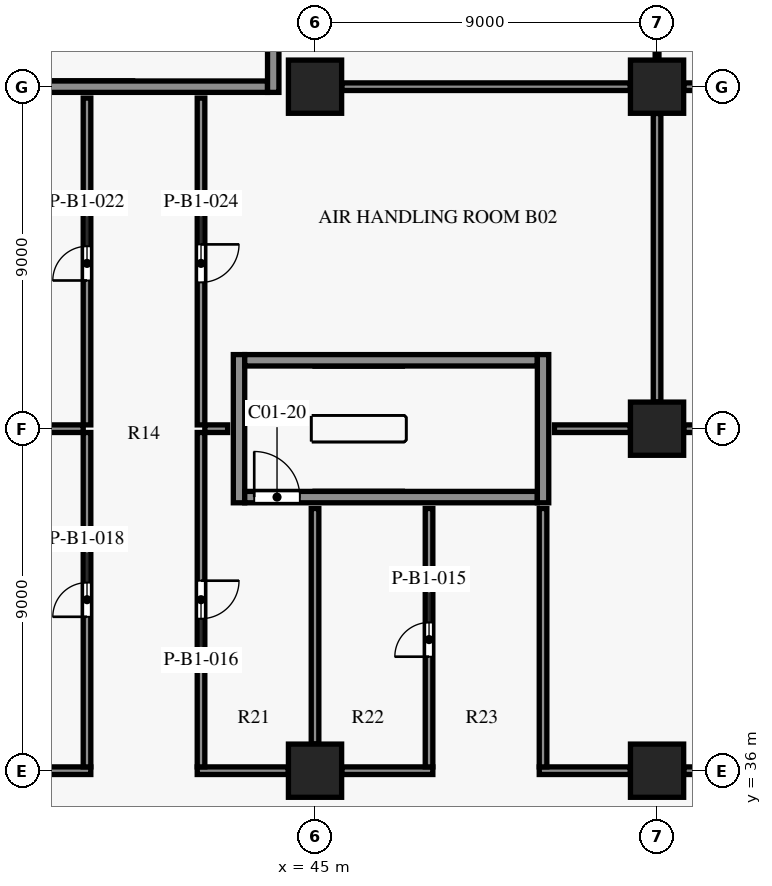
"""IFC4 building model, lengths in metres.
Left out: names, types, materials, properties, quantities, classifications, styles, units other than length and angle.
Written with IfcOpenShell. Run it as: python <this file> out.ifc"""

import sys

from ifc_helpers import new_model, si_unit, direction, frame, frame_2d, origin, origin_2d, place, context, subcontext, project, spatial, rectangle, extrude, element, fill, save


model = new_model("IFC4")
c1 = context("Model", 3, precision=1e-05, world=origin(), true_north=direction((0.0, 1.0)))
c2 = subcontext(c1, "Body", "Model", "MODEL_VIEW")
j1 = project(units=[si_unit("LENGTHUNIT", "METRE"), si_unit("PLANEANGLEUNIT", "RADIAN")], contexts=[c1])
p1 = place(None, origin())
s1 = spatial("IfcSite", under=j1, at=p1, CompositionType="ELEMENT")
p2 = place(p1, origin())
s2 = spatial("IfcBuilding", under=s1, at=p2, CompositionType="ELEMENT")
p3 = place(p2, frame((0.0, 0.0, -6.0)))
s3 = spatial("IfcBuildingStorey", under=s2, at=p3, CompositionType="ELEMENT", Elevation=-6.0)
for number, where, z_axis, x_axis in (
    (1, (45.0, 36.0, 0.0), (0.0, 0.0, 1.0), (1.0, 0.0, 0.0)),
    (2, (54.0, 36.0, 0.0), (0.0, 0.0, 1.0), (1.0, 0.0, 0.0)),
    (3, (45.0, 54.0, 0.0), (0.0, 0.0, 1.0), (1.0, 0.0, 0.0)),
    (4, (54.0, 45.0, 0.0), (0.0, 0.0, 1.0), (1.0, 0.0, 0.0)),
    (5, (54.0, 54.0, 0.0), (0.0, 0.0, 1.0), (1.0, 0.0, 0.0)),
):
    element("IfcColumn", number, at=place(p3, frame(where, z_axis=z_axis, x_axis=x_axis)), inside=s3, PredefinedType="COLUMN", context=c2, shape_type="SweptSolid", body=[
        extrude(rectangle(XDim=1.4, YDim=1.4, at=origin_2d()), origin(), (0.0, 0.0, 1.0), 6.0),
    ])
p4 = place(p3, frame((43.15, 43.2, 0.0), z_axis=(0.0, 0.0, 1.0), x_axis=(1.0, 0.0, 0.0)))
e6 = element("IfcWall", 6, at=p4, inside=s3, PredefinedType="SHEAR", context=c2, shape_type="SweptSolid", body=[
    extrude(rectangle(XDim=7.7, YDim=0.3, at=frame_2d((3.85, 0.0))), origin(), (0.0, 0.0, 1.0), 5.6),
])
p5 = place(p4, frame((0.25, 0.0, 0.0)))
e7 = element("IfcOpeningElement", 7, at=p5, cuts=e6, PredefinedType="OPENING", context=c2, shape_type="SweptSolid", body=[
    extrude(rectangle(XDim=1.2, YDim=2.2, at=frame_2d((0.6, 1.1))), frame((0.0, 0.16, 0.0), z_axis=(0.0, -1.0, 0.0), x_axis=(1.0, 0.0, 0.0)), (0.0, 0.0, 1.0), 0.32),
])
p6 = place(p3, frame((43.15, 46.8, 0.0), z_axis=(0.0, 0.0, 1.0), x_axis=(1.0, 0.0, 0.0)))
e8 = element("IfcWall", 8, at=p6, inside=s3, PredefinedType="SHEAR", context=c2, shape_type="SweptSolid", body=[
    extrude(rectangle(XDim=7.7, YDim=0.3, at=frame_2d((3.85, 0.0))), origin(), (0.0, 0.0, 1.0), 5.6),
])
p7 = place(p3, frame((36.05, 54.0, 0.0), z_axis=(0.0, 0.0, 1.0), x_axis=(1.0, 0.0, 0.0)))
e9 = element("IfcWall", 9, at=p7, inside=s3, PredefinedType="SHEAR", context=c2, shape_type="SweptSolid", body=[
    extrude(rectangle(XDim=7.7, YDim=0.3, at=frame_2d((3.85, 0.0))), origin(), (0.0, 0.0, 1.0), 5.6),
])
p8 = place(p7, frame((0.35, 0.0, 0.0)))
e10 = element("IfcOpeningElement", 10, at=p8, cuts=e9, PredefinedType="OPENING", context=c2, shape_type="SweptSolid", body=[
    extrude(rectangle(XDim=1.2, YDim=2.2, at=frame_2d((0.6, 1.1))), frame((0.0, 0.16, 0.0), z_axis=(0.0, -1.0, 0.0), x_axis=(1.0, 0.0, 0.0)), (0.0, 0.0, 1.0), 0.32),
])
for number, where, z_axis, x_axis in (
    (11, (43.0, 43.05, 0.0), (0.0, 0.0, 1.0), (0.0, 1.0, 0.0)),
    (12, (43.9, 53.85, 0.0), (0.0, 0.0, 1.0), (0.0, 1.0, 0.0)),
    (13, (51.0, 43.05, 0.0), (0.0, 0.0, 1.0), (0.0, 1.0, 0.0)),
):
    element("IfcWall", number, at=place(p3, frame(where, z_axis=z_axis, x_axis=x_axis)), inside=s3, PredefinedType="SHEAR", context=c2, shape_type="SweptSolid", body=[
        extrude(rectangle(XDim=3.9, YDim=0.3, at=frame_2d((1.95, 0.0))), origin(), (0.0, 0.0, 1.0), 5.6),
    ])
for number, where, z_axis, x_axis in (
    (14, (36.705, 36.0, 0.0), (0.0, 0.0, 1.0), (1.0, 0.0, 0.0)),
    (15, (41.9, 36.0, 0.0), (0.0, 0.0, 1.0), (1.0, 0.0, 0.0)),
    (16, (45.705, 36.0, 0.0), (0.0, 0.0, 1.0), (1.0, 0.0, 0.0)),
    (17, (50.9, 36.0, 0.0), (0.0, 0.0, 1.0), (1.0, 0.0, 0.0)),
):
    element("IfcWall", number, at=place(p3, frame(where, z_axis=z_axis, x_axis=x_axis)), inside=s3, PredefinedType="PARTITIONING", context=c2, shape_type="SweptSolid", body=[
        extrude(rectangle(XDim=2.395, YDim=0.2, at=frame_2d((1.198, 0.0))), origin(), (0.0, 0.0, 1.0), 5.58),
    ])
p9 = place(p3, frame((54.705, 36.0, 0.0), z_axis=(0.0, 0.0, 1.0), x_axis=(1.0, 0.0, 0.0)))
e18 = element("IfcWall", 18, at=p9, inside=s3, PredefinedType="PARTITIONING", context=c2, shape_type="SweptSolid", body=[
    extrude(rectangle(XDim=7.59, YDim=0.2, at=frame_2d((3.795, 0.0))), origin(), (0.0, 0.0, 1.0), 5.58),
])
p10 = place(p9, frame((3.295, 0.0, 0.0)))
e19 = element("IfcOpeningElement", 19, at=p10, cuts=e18, PredefinedType="OPENING", context=c2, shape_type="SweptSolid", body=[
    extrude(rectangle(XDim=1.0, YDim=2.1, at=frame_2d((0.5, 1.05))), frame((0.0, 0.11, 0.0), z_axis=(0.0, -1.0, 0.0), x_axis=(1.0, 0.0, 0.0)), (0.0, 0.0, 1.0), 0.22),
])
p11 = place(p3, frame((39.0, 36.1, 0.0), z_axis=(0.0, 0.0, 1.0), x_axis=(0.0, 1.0, 0.0)))
e20 = element("IfcWall", 20, at=p11, inside=s3, PredefinedType="PARTITIONING", context=c2, shape_type="SweptSolid", body=[
    extrude(rectangle(XDim=8.8, YDim=0.2, at=frame_2d((4.4, 0.0))), origin(), (0.0, 0.0, 1.0), 5.58),
])
p12 = place(p11, frame((3.95, 0.0, 0.0)))
e21 = element("IfcOpeningElement", 21, at=p12, cuts=e20, PredefinedType="OPENING", context=c2, shape_type="SweptSolid", body=[
    extrude(rectangle(XDim=0.9, YDim=2.1, at=frame_2d((0.45, 1.05))), frame((0.0, 0.11, 0.0), z_axis=(0.0, -1.0, 0.0), x_axis=(1.0, 0.0, 0.0)), (0.0, 0.0, 1.0), 0.22),
])
p13 = place(p3, frame((48.0, 36.1, 0.0), z_axis=(0.0, 0.0, 1.0), x_axis=(0.0, 1.0, 0.0)))
e22 = element("IfcWall", 22, at=p13, inside=s3, PredefinedType="PARTITIONING", context=c2, shape_type="SweptSolid", body=[
    extrude(rectangle(XDim=6.8, YDim=0.2, at=frame_2d((3.4, 0.0))), origin(), (0.0, 0.0, 1.0), 5.58),
])
p14 = place(p13, frame((2.9, 0.0, 0.0)))
e23 = element("IfcOpeningElement", 23, at=p14, cuts=e22, PredefinedType="OPENING", context=c2, shape_type="SweptSolid", body=[
    extrude(rectangle(XDim=0.9, YDim=2.1, at=frame_2d((0.45, 1.05))), frame((0.0, 0.11, 0.0), z_axis=(0.0, -1.0, 0.0), x_axis=(1.0, 0.0, 0.0)), (0.0, 0.0, 1.0), 0.22),
])
p15 = place(p3, frame((45.0, 36.705, 0.0), z_axis=(0.0, 0.0, 1.0), x_axis=(0.0, 1.0, 0.0)))
e24 = element("IfcWall", 24, at=p15, inside=s3, PredefinedType="PARTITIONING", context=c2, shape_type="SweptSolid", body=[
    extrude(rectangle(XDim=6.195, YDim=0.2, at=frame_2d((3.097, 0.0))), origin(), (0.0, 0.0, 1.0), 5.58),
])
p16 = place(p3, frame((51.0, 42.9, 0.0), z_axis=(0.0, 0.0, 1.0), x_axis=(0.0, -1.0, 0.0)))
e25 = element("IfcWall", 25, at=p16, inside=s3, PredefinedType="PARTITIONING", context=c2, shape_type="SweptSolid", body=[
    extrude(rectangle(XDim=6.8, YDim=0.2, at=frame_2d((3.4, 0.0))), origin(), (0.0, 0.0, 1.0), 5.58),
])
p17 = place(p3, frame((42.0, 44.9, 0.0), z_axis=(0.0, 0.0, 1.0), x_axis=(0.0, -1.0, 0.0)))
e26 = element("IfcWall", 26, at=p17, inside=s3, PredefinedType="PARTITIONING", context=c2, shape_type="SweptSolid", body=[
    extrude(rectangle(XDim=8.8, YDim=0.2, at=frame_2d((4.4, 0.0))), origin(), (0.0, 0.0, 1.0), 5.58),
])
p18 = place(p17, frame((3.9, 0.0, 0.0)))
e27 = element("IfcOpeningElement", 27, at=p18, cuts=e26, PredefinedType="OPENING", context=c2, shape_type="SweptSolid", body=[
    extrude(rectangle(XDim=1.0, YDim=2.1, at=frame_2d((0.5, 1.05))), frame((0.0, 0.11, 0.0), z_axis=(0.0, -1.0, 0.0), x_axis=(1.0, 0.0, 0.0)), (0.0, 0.0, 1.0), 0.22),
])
p19 = place(p3, frame((36.705, 45.0, 0.0), z_axis=(0.0, 0.0, 1.0), x_axis=(1.0, 0.0, 0.0)))
e28 = element("IfcWall", 28, at=p19, inside=s3, PredefinedType="PARTITIONING", context=c2, shape_type="SweptSolid", body=[
    extrude(rectangle(XDim=2.195, YDim=0.2, at=frame_2d((1.097, 0.0))), origin(), (0.0, 0.0, 1.0), 5.58),
])
p20 = place(p3, frame((42.1, 45.0, 0.0), z_axis=(0.0, 0.0, 1.0), x_axis=(1.0, 0.0, 0.0)))
e29 = element("IfcWall", 29, at=p20, inside=s3, PredefinedType="PARTITIONING", context=c2, shape_type="SweptSolid", body=[
    extrude(rectangle(XDim=0.6, YDim=0.2, at=frame_2d((0.3, 0.0))), origin(), (0.0, 0.0, 1.0), 5.58),
])
p21 = place(p3, frame((51.3, 45.0, 0.0), z_axis=(0.0, 0.0, 1.0), x_axis=(1.0, 0.0, 0.0)))
e30 = element("IfcWall", 30, at=p21, inside=s3, PredefinedType="PARTITIONING", context=c2, shape_type="SweptSolid", body=[
    extrude(rectangle(XDim=1.995, YDim=0.2, at=frame_2d((0.998, 0.0))), origin(), (0.0, 0.0, 1.0), 5.58),
])
p22 = place(p3, frame((54.705, 45.0, 0.0), z_axis=(0.0, 0.0, 1.0), x_axis=(1.0, 0.0, 0.0)))
e31 = element("IfcWall", 31, at=p22, inside=s3, PredefinedType="PARTITIONING", context=c2, shape_type="SweptSolid", body=[
    extrude(rectangle(XDim=7.59, YDim=0.2, at=frame_2d((3.795, 0.0))), origin(), (0.0, 0.0, 1.0), 5.58),
])
p23 = place(p3, frame((39.0, 45.1, 0.0), z_axis=(0.0, 0.0, 1.0), x_axis=(0.0, 1.0, 0.0)))
e32 = element("IfcWall", 32, at=p23, inside=s3, PredefinedType="PARTITIONING", context=c2, shape_type="SweptSolid", body=[
    extrude(rectangle(XDim=8.6, YDim=0.2, at=frame_2d((4.3, 0.0))), origin(), (0.0, 0.0, 1.0), 5.58),
])
p24 = place(p23, frame((3.8, 0.0, 0.0)))
e33 = element("IfcOpeningElement", 33, at=p24, cuts=e32, PredefinedType="OPENING", context=c2, shape_type="SweptSolid", body=[
    extrude(rectangle(XDim=0.9, YDim=2.1, at=frame_2d((0.45, 1.05))), frame((0.0, 0.11, 0.0), z_axis=(0.0, -1.0, 0.0), x_axis=(1.0, 0.0, 0.0)), (0.0, 0.0, 1.0), 0.22),
])
p25 = place(p3, frame((54.0, 45.705, 0.0), z_axis=(0.0, 0.0, 1.0), x_axis=(0.0, 1.0, 0.0)))
e34 = element("IfcWall", 34, at=p25, inside=s3, PredefinedType="PARTITIONING", context=c2, shape_type="SweptSolid", body=[
    extrude(rectangle(XDim=7.59, YDim=0.2, at=frame_2d((3.795, 0.0))), origin(), (0.0, 0.0, 1.0), 5.58),
])
p26 = place(p3, frame((42.0, 53.7, 0.0), z_axis=(0.0, 0.0, 1.0), x_axis=(0.0, -1.0, 0.0)))
e35 = element("IfcWall", 35, at=p26, inside=s3, PredefinedType="PARTITIONING", context=c2, shape_type="SweptSolid", body=[
    extrude(rectangle(XDim=8.6, YDim=0.2, at=frame_2d((4.3, 0.0))), origin(), (0.0, 0.0, 1.0), 5.58),
])
p27 = place(p26, frame((3.85, 0.0, 0.0)))
e36 = element("IfcOpeningElement", 36, at=p27, cuts=e35, PredefinedType="OPENING", context=c2, shape_type="SweptSolid", body=[
    extrude(rectangle(XDim=1.0, YDim=2.1, at=frame_2d((0.5, 1.05))), frame((0.0, 0.11, 0.0), z_axis=(0.0, -1.0, 0.0), x_axis=(1.0, 0.0, 0.0)), (0.0, 0.0, 1.0), 0.22),
])
for number, where, z_axis, x_axis in (
    (37, (45.705, 54.0, 0.0), (0.0, 0.0, 1.0), (1.0, 0.0, 0.0)),
    (38, (62.295, 54.0, 0.0), (0.0, 0.0, 1.0), (-1.0, 0.0, 0.0)),
):
    element("IfcWall", number, at=place(p3, frame(where, z_axis=z_axis, x_axis=x_axis)), inside=s3, PredefinedType="PARTITIONING", context=c2, shape_type="SweptSolid", body=[
        extrude(rectangle(XDim=7.59, YDim=0.2, at=frame_2d((3.795, 0.0))), origin(), (0.0, 0.0, 1.0), 5.58),
    ])
p28 = place(p3, frame((54.0, 54.705, 0.0), z_axis=(0.0, 0.0, 1.0), x_axis=(0.0, 1.0, 0.0)))
e39 = element("IfcWall", 39, at=p28, inside=s3, PredefinedType="PARTITIONING", context=c2, shape_type="SweptSolid", body=[
    extrude(rectangle(XDim=7.59, YDim=0.1, at=frame_2d((3.795, 0.0))), origin(), (0.0, 0.0, 1.0), 5.58),
])
p29 = place(p5, origin())
e40 = element("IfcDoor", 40, at=p29, inside=s3, OperationType="SINGLE_SWING_RIGHT", PredefinedType="DOOR", context=c2, shape_type="SweptSolid", body=[
    extrude(rectangle(XDim=1.2, YDim=2.2, at=frame_2d((0.6, 1.1))), frame((0.0, 0.025, 0.0), z_axis=(0.0, -1.0, 0.0), x_axis=(1.0, 0.0, 0.0)), (0.0, 0.0, 1.0), 0.05),
])
fill(e7, e40)
p30 = place(p14, origin())
e41 = element("IfcDoor", 41, at=p30, inside=s3, OperationType="SINGLE_SWING_LEFT", PredefinedType="DOOR", context=c2, shape_type="SweptSolid", body=[
    extrude(rectangle(XDim=0.9, YDim=2.1, at=frame_2d((0.45, 1.05))), frame((0.0, 0.025, 0.0), z_axis=(0.0, -1.0, 0.0), x_axis=(1.0, 0.0, 0.0)), (0.0, 0.0, 1.0), 0.05),
])
fill(e23, e41)
p31 = place(p18, origin())
e42 = element("IfcDoor", 42, at=p31, inside=s3, OperationType="SINGLE_SWING_RIGHT", PredefinedType="DOOR", context=c2, shape_type="SweptSolid", body=[
    extrude(rectangle(XDim=1.0, YDim=2.1, at=frame_2d((0.5, 1.05))), frame((0.0, 0.025, 0.0), z_axis=(0.0, -1.0, 0.0), x_axis=(1.0, 0.0, 0.0)), (0.0, 0.0, 1.0), 0.05),
])
fill(e27, e42)
p32 = place(p12, origin())
e43 = element("IfcDoor", 43, at=p32, inside=s3, OperationType="SINGLE_SWING_RIGHT", PredefinedType="DOOR", context=c2, shape_type="SweptSolid", body=[
    extrude(rectangle(XDim=0.9, YDim=2.1, at=frame_2d((0.45, 1.05))), frame((0.0, 0.025, 0.0), z_axis=(0.0, -1.0, 0.0), x_axis=(1.0, 0.0, 0.0)), (0.0, 0.0, 1.0), 0.05),
])
fill(e21, e43)
p33 = place(p24, origin())
e44 = element("IfcDoor", 44, at=p33, inside=s3, OperationType="SINGLE_SWING_RIGHT", PredefinedType="DOOR", context=c2, shape_type="SweptSolid", body=[
    extrude(rectangle(XDim=0.9, YDim=2.1, at=frame_2d((0.45, 1.05))), frame((0.0, 0.025, 0.0), z_axis=(0.0, -1.0, 0.0), x_axis=(1.0, 0.0, 0.0)), (0.0, 0.0, 1.0), 0.05),
])
fill(e33, e44)
p34 = place(p27, origin())
e45 = element("IfcDoor", 45, at=p34, inside=s3, OperationType="SINGLE_SWING_RIGHT", PredefinedType="DOOR", context=c2, shape_type="SweptSolid", body=[
    extrude(rectangle(XDim=1.0, YDim=2.1, at=frame_2d((0.5, 1.05))), frame((0.0, 0.025, 0.0), z_axis=(0.0, -1.0, 0.0), x_axis=(1.0, 0.0, 0.0)), (0.0, 0.0, 1.0), 0.05),
])
fill(e36, e45)
save(model, sys.argv[1])
